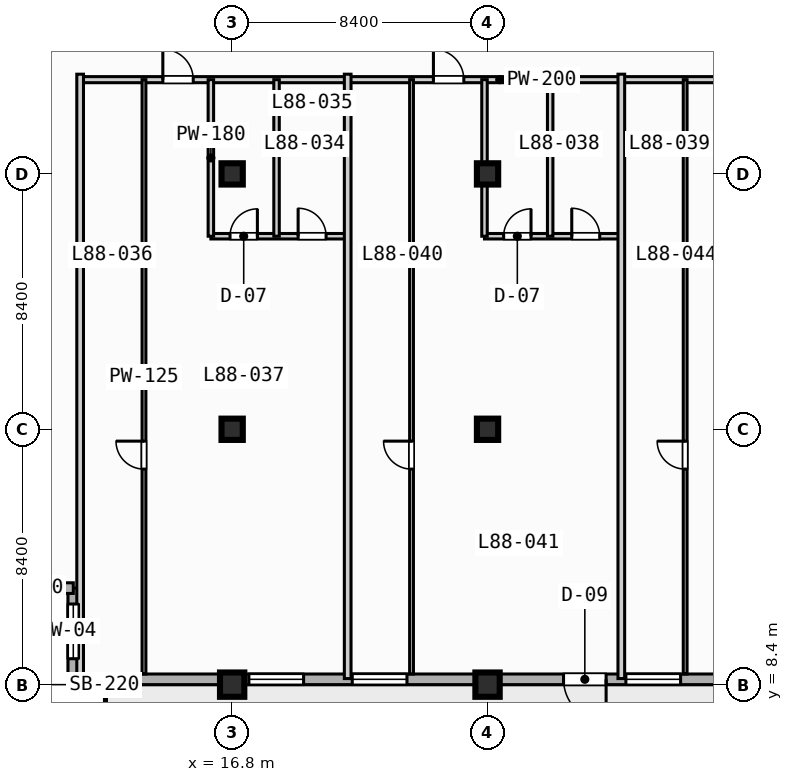
"""IFC4 building model, lengths in metres.
Left out: names, types, materials, properties, quantities, classifications, styles, units other than length and angle.
Written with IfcOpenShell. Run it as: python <this file> out.ifc"""

import sys

from ifc_helpers import new_model, si_unit, direction, frame, frame_2d, origin, origin_2d, place, context, subcontext, project, spatial, rectangle, extrude, element, fill, save


model = new_model("IFC4")
c1 = context("Model", 3, precision=1e-05, world=origin(), true_north=direction((0.0, 1.0)))
c2 = subcontext(c1, "Body", "Model", "MODEL_VIEW")
j1 = project(units=[si_unit("LENGTHUNIT", "METRE"), si_unit("PLANEANGLEUNIT", "RADIAN")], contexts=[c1])
p1 = place(None, origin())
s1 = spatial("IfcSite", under=j1, at=p1, CompositionType="ELEMENT")
p2 = place(p1, origin())
s2 = spatial("IfcBuilding", under=s1, at=p2, CompositionType="ELEMENT")
p3 = place(p2, frame((0.0, 0.0, 355.4)))
s3 = spatial("IfcBuildingStorey", under=s2, at=p3, CompositionType="ELEMENT", Elevation=355.4)
p4 = place(p3, frame((16.8, 8.4, 0.0), z_axis=(0.0, 0.0, 1.0), x_axis=(1.0, 0.0, 0.0)))
e1 = element("IfcColumn", 1, at=p4, inside=s3, PredefinedType="COLUMN", context=c2, shape_type="SweptSolid", body=[
    extrude(rectangle(XDim=0.8, YDim=0.8, at=origin_2d()), origin(), (0.0, 0.0, 1.0), 4.2),
])
for number, where, z_axis, x_axis in (
    (2, (16.8, 16.8, 0.0), (0.0, 0.0, 1.0), (1.0, 0.0, 0.0)),
    (3, (16.8, 25.2, 0.0), (0.0, 0.0, 1.0), (1.0, 0.0, 0.0)),
):
    element("IfcColumn", number, at=place(p3, frame(where, z_axis=z_axis, x_axis=x_axis)), inside=s3, PredefinedType="COLUMN", context=c2, shape_type="SweptSolid", body=[
        extrude(rectangle(XDim=0.7, YDim=0.7, at=origin_2d()), origin(), (0.0, 0.0, 1.0), 4.2),
    ])
p5 = place(p3, frame((25.2, 8.4, 0.0), z_axis=(0.0, 0.0, 1.0), x_axis=(1.0, 0.0, 0.0)))
e4 = element("IfcColumn", 4, at=p5, inside=s3, PredefinedType="COLUMN", context=c2, shape_type="SweptSolid", body=[
    extrude(rectangle(XDim=0.8, YDim=0.8, at=origin_2d()), origin(), (0.0, 0.0, 1.0), 4.2),
])
for number, where, z_axis, x_axis in (
    (5, (25.2, 16.8, 0.0), (0.0, 0.0, 1.0), (1.0, 0.0, 0.0)),
    (6, (25.2, 25.2, 0.0), (0.0, 0.0, 1.0), (1.0, 0.0, 0.0)),
):
    element("IfcColumn", number, at=place(p3, frame(where, z_axis=z_axis, x_axis=x_axis)), inside=s3, PredefinedType="COLUMN", context=c2, shape_type="SweptSolid", body=[
        extrude(rectangle(XDim=0.7, YDim=0.7, at=origin_2d()), origin(), (0.0, 0.0, 1.0), 4.2),
    ])
p6 = place(p3, frame((11.575, 8.575, 0.0), z_axis=(0.0, 0.0, 1.0), x_axis=(0.0, 1.0, 0.0)))
e7 = element("IfcWall", 7, at=p6, inside=s3, PredefinedType="STANDARD", context=c2, shape_type="SweptSolid", body=[
    extrude(rectangle(XDim=3.0, YDim=0.35, at=frame_2d((1.5, 0.0))), origin(), (0.0, 0.0, 1.0), 3.97),
])
p7 = place(p6, frame((0.677, 0.0, 0.85)))
e8 = element("IfcOpeningElement", 8, at=p7, cuts=e7, PredefinedType="OPENING", context=c2, shape_type="SweptSolid", body=[
    extrude(rectangle(XDim=1.8, YDim=1.8, at=frame_2d((0.9, 0.9))), frame((0.0, 0.185, 0.0), z_axis=(0.0, -1.0, 0.0), x_axis=(1.0, 0.0, 0.0)), (0.0, 0.0, 1.0), 0.37),
])
p8 = place(p3, frame((11.575, 11.575, 0.0), z_axis=(0.0, 0.0, 1.0), x_axis=(-1.0, 0.0, 0.0)))
e9 = element("IfcWall", 9, at=p8, inside=s3, PredefinedType="STANDARD", context=c2, shape_type="SweptSolid", body=[
    extrude(rectangle(XDim=3.0, YDim=0.35, at=frame_2d((1.5, 0.0))), origin(), (0.0, 0.0, 1.0), 3.97),
])
p9 = place(p3, frame((64.025, 8.575, 0.0), z_axis=(0.0, 0.0, 1.0), x_axis=(-1.0, 0.0, 0.0)))
e10 = element("IfcWall", 10, at=p9, inside=s3, PredefinedType="STANDARD", context=c2, shape_type="SweptSolid", body=[
    extrude(rectangle(XDim=52.45, YDim=0.35, at=frame_2d((26.225, 0.0))), origin(), (0.0, 0.0, 1.0), 3.97),
])
p10 = place(p9, frame((34.925, 0.0, 0.0)))
e11 = element("IfcOpeningElement", 11, at=p10, cuts=e10, PredefinedType="OPENING", context=c2, shape_type="SweptSolid", body=[
    extrude(rectangle(XDim=1.4, YDim=2.2, at=frame_2d((0.7, 1.1))), frame((0.0, 0.185, 0.0), z_axis=(0.0, -1.0, 0.0), x_axis=(1.0, 0.0, 0.0)), (0.0, 0.0, 1.0), 0.37),
])
p11 = place(p9, frame((24.825, 0.0, 0.85)))
e12 = element("IfcOpeningElement", 12, at=p11, cuts=e10, PredefinedType="OPENING", context=c2, shape_type="SweptSolid", body=[
    extrude(rectangle(XDim=2.8, YDim=2.1, at=frame_2d((1.4, 1.05))), frame((0.0, 0.185, 0.0), z_axis=(0.0, -1.0, 0.0), x_axis=(1.0, 0.0, 0.0)), (0.0, 0.0, 1.0), 0.37),
])
p12 = place(p9, frame((16.425, 0.0, 0.85)))
e13 = element("IfcOpeningElement", 13, at=p12, cuts=e10, PredefinedType="OPENING", context=c2, shape_type="SweptSolid", body=[
    extrude(rectangle(XDim=2.8, YDim=2.1, at=frame_2d((1.4, 1.05))), frame((0.0, 0.185, 0.0), z_axis=(0.0, -1.0, 0.0), x_axis=(1.0, 0.0, 0.0)), (0.0, 0.0, 1.0), 0.37),
])
p13 = place(p9, frame((50.275, 0.0, 0.85)))
e14 = element("IfcOpeningElement", 14, at=p13, cuts=e10, PredefinedType="OPENING", context=c2, shape_type="SweptSolid", body=[
    extrude(rectangle(XDim=1.8, YDim=1.8, at=frame_2d((0.9, 0.9))), frame((0.0, 0.185, 0.0), z_axis=(0.0, -1.0, 0.0), x_axis=(1.0, 0.0, 0.0)), (0.0, 0.0, 1.0), 0.37),
])
p14 = place(p9, frame((44.875, 0.0, 0.85)))
e15 = element("IfcOpeningElement", 15, at=p14, cuts=e10, PredefinedType="OPENING", context=c2, shape_type="SweptSolid", body=[
    extrude(rectangle(XDim=1.8, YDim=1.8, at=frame_2d((0.9, 0.9))), frame((0.0, 0.185, 0.0), z_axis=(0.0, -1.0, 0.0), x_axis=(1.0, 0.0, 0.0)), (0.0, 0.0, 1.0), 0.37),
])
p15 = place(p9, frame((41.475, 0.0, 0.85)))
e16 = element("IfcOpeningElement", 16, at=p15, cuts=e10, PredefinedType="OPENING", context=c2, shape_type="SweptSolid", body=[
    extrude(rectangle(XDim=1.8, YDim=1.8, at=frame_2d((0.9, 0.9))), frame((0.0, 0.185, 0.0), z_axis=(0.0, -1.0, 0.0), x_axis=(1.0, 0.0, 0.0)), (0.0, 0.0, 1.0), 0.37),
])
p16 = place(p9, frame((32.475, 0.0, 0.85)))
e17 = element("IfcOpeningElement", 17, at=p16, cuts=e10, PredefinedType="OPENING", context=c2, shape_type="SweptSolid", body=[
    extrude(rectangle(XDim=1.8, YDim=1.8, at=frame_2d((0.9, 0.9))), frame((0.0, 0.185, 0.0), z_axis=(0.0, -1.0, 0.0), x_axis=(1.0, 0.0, 0.0)), (0.0, 0.0, 1.0), 0.37),
])
p17 = place(p3, frame((11.8, 28.3, 0.0), z_axis=(0.0, 0.0, 1.0), x_axis=(1.0, 0.0, 0.0)))
e18 = element("IfcWall", 18, at=p17, inside=s3, PredefinedType="PARTITIONING", context=c2, shape_type="SweptSolid", body=[
    extrude(rectangle(XDim=27.6, YDim=0.2, at=frame_2d((13.8, 0.0))), origin(), (0.0, 0.0, 1.0), 3.97),
])
p18 = place(p17, frame((2.72, 0.0, 0.0)))
e19 = element("IfcOpeningElement", 19, at=p18, cuts=e18, PredefinedType="OPENING", context=c2, shape_type="SweptSolid", body=[
    extrude(rectangle(XDim=1.0, YDim=2.15, at=frame_2d((0.5, 1.075))), frame((0.0, 0.11, 0.0), z_axis=(0.0, -1.0, 0.0), x_axis=(1.0, 0.0, 0.0)), (0.0, 0.0, 1.0), 0.22),
])
p19 = place(p17, frame((11.62, 0.0, 0.0)))
e20 = element("IfcOpeningElement", 20, at=p19, cuts=e18, PredefinedType="OPENING", context=c2, shape_type="SweptSolid", body=[
    extrude(rectangle(XDim=1.0, YDim=2.15, at=frame_2d((0.5, 1.075))), frame((0.0, 0.11, 0.0), z_axis=(0.0, -1.0, 0.0), x_axis=(1.0, 0.0, 0.0)), (0.0, 0.0, 1.0), 0.22),
])
p20 = place(p17, frame((21.02, 0.0, 0.0)))
e21 = element("IfcOpeningElement", 21, at=p20, cuts=e18, PredefinedType="OPENING", context=c2, shape_type="SweptSolid", body=[
    extrude(rectangle(XDim=1.0, YDim=2.15, at=frame_2d((0.5, 1.075))), frame((0.0, 0.11, 0.0), z_axis=(0.0, -1.0, 0.0), x_axis=(1.0, 0.0, 0.0)), (0.0, 0.0, 1.0), 0.22),
])
p21 = place(p3, frame((11.8, 8.6, 0.0), z_axis=(0.0, 0.0, 1.0), x_axis=(0.0, 1.0, 0.0)))
e22 = element("IfcWall", 22, at=p21, inside=s3, PredefinedType="PARTITIONING", context=c2, shape_type="SweptSolid", body=[
    extrude(rectangle(XDim=19.88, YDim=0.22, at=frame_2d((9.94, 0.0))), origin(), (0.0, 0.0, 1.0), 3.97),
])
p22 = place(p3, frame((16.1, 23.15, 0.0), z_axis=(0.0, 0.0, 1.0), x_axis=(1.0, 0.0, 0.0)))
e23 = element("IfcWall", 23, at=p22, inside=s3, PredefinedType="PLUMBINGWALL", context=c2, shape_type="SweptSolid", body=[
    extrude(rectangle(XDim=4.5, YDim=0.18, at=frame_2d((2.25, 0.0))), origin(), (0.0, 0.0, 1.0), 3.97),
])
p23 = place(p22, frame((0.63, 0.0, 0.0)))
e24 = element("IfcOpeningElement", 24, at=p23, cuts=e23, PredefinedType="OPENING", context=c2, shape_type="SweptSolid", body=[
    extrude(rectangle(XDim=0.9, YDim=2.1, at=frame_2d((0.45, 1.05))), frame((0.0, 0.1, 0.0), z_axis=(0.0, -1.0, 0.0), x_axis=(1.0, 0.0, 0.0)), (0.0, 0.0, 1.0), 0.2),
])
p24 = place(p22, frame((2.87, 0.0, 0.0)))
e25 = element("IfcOpeningElement", 25, at=p24, cuts=e23, PredefinedType="OPENING", context=c2, shape_type="SweptSolid", body=[
    extrude(rectangle(XDim=0.92, YDim=2.1, at=frame_2d((0.46, 1.05))), frame((0.0, 0.1, 0.0), z_axis=(0.0, -1.0, 0.0), x_axis=(1.0, 0.0, 0.0)), (0.0, 0.0, 1.0), 0.2),
])
for number, where, z_axis, x_axis in (
    (26, (16.1, 23.15, 0.0), (0.0, 0.0, 1.0), (0.0, 1.0, 0.0)),
    (27, (18.26, 23.15, 0.0), (0.0, 0.0, 1.0), (0.0, 1.0, 0.0)),
):
    element("IfcWall", number, at=place(p3, frame(where, z_axis=z_axis, x_axis=x_axis)), inside=s3, PredefinedType="PLUMBINGWALL", context=c2, shape_type="SweptSolid", body=[
        extrude(rectangle(XDim=5.15, YDim=0.18, at=frame_2d((2.575, 0.0))), origin(), (0.0, 0.0, 1.0), 3.97),
    ])
p25 = place(p3, frame((13.9, 8.75, 0.0), z_axis=(0.0, 0.0, 1.0), x_axis=(0.0, 1.0, 0.0)))
e28 = element("IfcWall", 28, at=p25, inside=s3, PredefinedType="PARTITIONING", context=c2, shape_type="SweptSolid", body=[
    extrude(rectangle(XDim=19.55, YDim=0.125, at=frame_2d((9.775, 0.0))), origin(), (0.0, 0.0, 1.0), 3.97),
])
p26 = place(p25, frame((6.74, 0.0, 0.0)))
e29 = element("IfcOpeningElement", 29, at=p26, cuts=e28, PredefinedType="OPENING", context=c2, shape_type="SweptSolid", body=[
    extrude(rectangle(XDim=0.92, YDim=2.1, at=frame_2d((0.46, 1.05))), frame((0.0, 0.073, 0.0), z_axis=(0.0, -1.0, 0.0), x_axis=(1.0, 0.0, 0.0)), (0.0, 0.0, 1.0), 0.145),
])
p27 = place(p3, frame((20.6, 8.6, 0.0), z_axis=(0.0, 0.0, 1.0), x_axis=(0.0, 1.0, 0.0)))
e30 = element("IfcWall", 30, at=p27, inside=s3, PredefinedType="PARTITIONING", context=c2, shape_type="SweptSolid", body=[
    extrude(rectangle(XDim=19.88, YDim=0.22, at=frame_2d((9.94, 0.0))), origin(), (0.0, 0.0, 1.0), 3.97),
])
p28 = place(p3, frame((25.1, 23.15, 0.0), z_axis=(0.0, 0.0, 1.0), x_axis=(1.0, 0.0, 0.0)))
e31 = element("IfcWall", 31, at=p28, inside=s3, PredefinedType="PLUMBINGWALL", context=c2, shape_type="SweptSolid", body=[
    extrude(rectangle(XDim=4.5, YDim=0.18, at=frame_2d((2.25, 0.0))), origin(), (0.0, 0.0, 1.0), 3.97),
])
p29 = place(p28, frame((0.63, 0.0, 0.0)))
e32 = element("IfcOpeningElement", 32, at=p29, cuts=e31, PredefinedType="OPENING", context=c2, shape_type="SweptSolid", body=[
    extrude(rectangle(XDim=0.9, YDim=2.1, at=frame_2d((0.45, 1.05))), frame((0.0, 0.1, 0.0), z_axis=(0.0, -1.0, 0.0), x_axis=(1.0, 0.0, 0.0)), (0.0, 0.0, 1.0), 0.2),
])
p30 = place(p28, frame((2.87, 0.0, 0.0)))
e33 = element("IfcOpeningElement", 33, at=p30, cuts=e31, PredefinedType="OPENING", context=c2, shape_type="SweptSolid", body=[
    extrude(rectangle(XDim=0.92, YDim=2.1, at=frame_2d((0.46, 1.05))), frame((0.0, 0.1, 0.0), z_axis=(0.0, -1.0, 0.0), x_axis=(1.0, 0.0, 0.0)), (0.0, 0.0, 1.0), 0.2),
])
p31 = place(p3, frame((25.1, 23.15, 0.0), z_axis=(0.0, 0.0, 1.0), x_axis=(0.0, 1.0, 0.0)))
e34 = element("IfcWall", 34, at=p31, inside=s3, PredefinedType="PLUMBINGWALL", context=c2, shape_type="SweptSolid", body=[
    extrude(rectangle(XDim=5.15, YDim=0.18, at=frame_2d((2.575, 0.0))), origin(), (0.0, 0.0, 1.0), 3.37),
])
p32 = place(p3, frame((27.26, 23.15, 0.0), z_axis=(0.0, 0.0, 1.0), x_axis=(0.0, 1.0, 0.0)))
e35 = element("IfcWall", 35, at=p32, inside=s3, PredefinedType="PLUMBINGWALL", context=c2, shape_type="SweptSolid", body=[
    extrude(rectangle(XDim=5.15, YDim=0.18, at=frame_2d((2.575, 0.0))), origin(), (0.0, 0.0, 1.0), 3.97),
])
p33 = place(p3, frame((22.7, 8.75, 0.0), z_axis=(0.0, 0.0, 1.0), x_axis=(0.0, 1.0, 0.0)))
e36 = element("IfcWall", 36, at=p33, inside=s3, PredefinedType="PARTITIONING", context=c2, shape_type="SweptSolid", body=[
    extrude(rectangle(XDim=19.55, YDim=0.125, at=frame_2d((9.775, 0.0))), origin(), (0.0, 0.0, 1.0), 3.97),
])
p34 = place(p33, frame((6.74, 0.0, 0.0)))
e37 = element("IfcOpeningElement", 37, at=p34, cuts=e36, PredefinedType="OPENING", context=c2, shape_type="SweptSolid", body=[
    extrude(rectangle(XDim=0.92, YDim=2.1, at=frame_2d((0.46, 1.05))), frame((0.0, 0.073, 0.0), z_axis=(0.0, -1.0, 0.0), x_axis=(1.0, 0.0, 0.0)), (0.0, 0.0, 1.0), 0.145),
])
p35 = place(p3, frame((29.6, 8.6, 0.0), z_axis=(0.0, 0.0, 1.0), x_axis=(0.0, 1.0, 0.0)))
e38 = element("IfcWall", 38, at=p35, inside=s3, PredefinedType="PARTITIONING", context=c2, shape_type="SweptSolid", body=[
    extrude(rectangle(XDim=19.88, YDim=0.22, at=frame_2d((9.94, 0.0))), origin(), (0.0, 0.0, 1.0), 3.607),
])
p36 = place(p3, frame((31.7, 8.75, 0.0), z_axis=(0.0, 0.0, 1.0), x_axis=(0.0, 1.0, 0.0)))
e39 = element("IfcWall", 39, at=p36, inside=s3, PredefinedType="PARTITIONING", context=c2, shape_type="SweptSolid", body=[
    extrude(rectangle(XDim=19.55, YDim=0.125, at=frame_2d((9.775, 0.0))), origin(), (0.0, 0.0, 1.0), 3.97),
])
p37 = place(p36, frame((6.74, 0.0, 0.0)))
e40 = element("IfcOpeningElement", 40, at=p37, cuts=e39, PredefinedType="OPENING", context=c2, shape_type="SweptSolid", body=[
    extrude(rectangle(XDim=0.92, YDim=2.1, at=frame_2d((0.46, 1.05))), frame((0.0, 0.073, 0.0), z_axis=(0.0, -1.0, 0.0), x_axis=(1.0, 0.0, 0.0)), (0.0, 0.0, 1.0), 0.145),
])
p38 = place(p7, origin())
e41 = element("IfcWindow", 41, at=p38, inside=s3, PartitioningType="SINGLE_PANEL", PredefinedType="WINDOW", context=c2, shape_type="SweptSolid", body=[
    extrude(rectangle(XDim=1.8, YDim=1.8, at=frame_2d((0.9, 0.9))), frame((0.0, 0.03, 0.0), z_axis=(0.0, -1.0, 0.0), x_axis=(1.0, 0.0, 0.0)), (0.0, 0.0, 1.0), 0.06),
])
fill(e8, e41)
p39 = place(p10, origin())
e42 = element("IfcDoor", 42, at=p39, inside=s3, OperationType="SINGLE_SWING_LEFT", PredefinedType="DOOR", context=c2, shape_type="SweptSolid", body=[
    extrude(rectangle(XDim=1.4, YDim=2.2, at=frame_2d((0.7, 1.1))), frame((0.0, 0.025, 0.0), z_axis=(0.0, -1.0, 0.0), x_axis=(1.0, 0.0, 0.0)), (0.0, 0.0, 1.0), 0.05),
])
fill(e11, e42)
p40 = place(p13, origin())
e43 = element("IfcWindow", 43, at=p40, inside=s3, PartitioningType="SINGLE_PANEL", PredefinedType="WINDOW", context=c2, shape_type="SweptSolid", body=[
    extrude(rectangle(XDim=1.8, YDim=1.8, at=frame_2d((0.9, 0.9))), frame((0.0, 0.03, 0.0), z_axis=(0.0, -1.0, 0.0), x_axis=(1.0, 0.0, 0.0)), (0.0, 0.0, 1.0), 0.06),
])
fill(e14, e43)
p41 = place(p14, origin())
e44 = element("IfcWindow", 44, at=p41, inside=s3, PartitioningType="SINGLE_PANEL", PredefinedType="WINDOW", context=c2, shape_type="SweptSolid", body=[
    extrude(rectangle(XDim=1.8, YDim=1.8, at=frame_2d((0.9, 0.9))), frame((0.0, 0.03, 0.0), z_axis=(0.0, -1.0, 0.0), x_axis=(1.0, 0.0, 0.0)), (0.0, 0.0, 1.0), 0.06),
])
fill(e15, e44)
p42 = place(p15, origin())
e45 = element("IfcWindow", 45, at=p42, inside=s3, PartitioningType="SINGLE_PANEL", PredefinedType="WINDOW", context=c2, shape_type="SweptSolid", body=[
    extrude(rectangle(XDim=1.8, YDim=1.8, at=frame_2d((0.9, 0.9))), frame((0.0, 0.03, 0.0), z_axis=(0.0, -1.0, 0.0), x_axis=(1.0, 0.0, 0.0)), (0.0, 0.0, 1.0), 0.06),
])
fill(e16, e45)
p43 = place(p16, origin())
e46 = element("IfcWindow", 46, at=p43, inside=s3, PartitioningType="SINGLE_PANEL", PredefinedType="WINDOW", context=c2, shape_type="SweptSolid", body=[
    extrude(rectangle(XDim=1.8, YDim=1.8, at=frame_2d((0.9, 0.9))), frame((0.0, 0.03, 0.0), z_axis=(0.0, -1.0, 0.0), x_axis=(1.0, 0.0, 0.0)), (0.0, 0.0, 1.0), 0.06),
])
fill(e17, e46)
p44 = place(p18, origin())
e47 = element("IfcDoor", 47, at=p44, inside=s3, OperationType="SINGLE_SWING_LEFT", PredefinedType="DOOR", context=c2, shape_type="SweptSolid", body=[
    extrude(rectangle(XDim=1.0, YDim=2.15, at=frame_2d((0.5, 1.075))), frame((0.0, 0.025, 0.0), z_axis=(0.0, -1.0, 0.0), x_axis=(1.0, 0.0, 0.0)), (0.0, 0.0, 1.0), 0.05),
])
fill(e19, e47)
p45 = place(p19, origin())
e48 = element("IfcDoor", 48, at=p45, inside=s3, OperationType="SINGLE_SWING_LEFT", PredefinedType="DOOR", context=c2, shape_type="SweptSolid", body=[
    extrude(rectangle(XDim=1.0, YDim=2.15, at=frame_2d((0.5, 1.075))), frame((0.0, 0.025, 0.0), z_axis=(0.0, -1.0, 0.0), x_axis=(1.0, 0.0, 0.0)), (0.0, 0.0, 1.0), 0.05),
])
fill(e20, e48)
p46 = place(p23, origin())
e49 = element("IfcDoor", 49, at=p46, inside=s3, OperationType="SINGLE_SWING_RIGHT", PredefinedType="DOOR", context=c2, shape_type="SweptSolid", body=[
    extrude(rectangle(XDim=0.9, YDim=2.1, at=frame_2d((0.45, 1.05))), frame((0.0, 0.025, 0.0), z_axis=(0.0, -1.0, 0.0), x_axis=(1.0, 0.0, 0.0)), (0.0, 0.0, 1.0), 0.05),
])
fill(e24, e49)
p47 = place(p24, origin())
e50 = element("IfcDoor", 50, at=p47, inside=s3, OperationType="SINGLE_SWING_LEFT", PredefinedType="DOOR", context=c2, shape_type="SweptSolid", body=[
    extrude(rectangle(XDim=0.92, YDim=2.1, at=frame_2d((0.46, 1.05))), frame((0.0, 0.025, 0.0), z_axis=(0.0, -1.0, 0.0), x_axis=(1.0, 0.0, 0.0)), (0.0, 0.0, 1.0), 0.05),
])
fill(e25, e50)
p48 = place(p26, origin())
e51 = element("IfcDoor", 51, at=p48, inside=s3, OperationType="SINGLE_SWING_RIGHT", PredefinedType="DOOR", context=c2, shape_type="SweptSolid", body=[
    extrude(rectangle(XDim=0.92, YDim=2.1, at=frame_2d((0.46, 1.05))), frame((0.0, 0.025, 0.0), z_axis=(0.0, -1.0, 0.0), x_axis=(1.0, 0.0, 0.0)), (0.0, 0.0, 1.0), 0.05),
])
fill(e29, e51)
p49 = place(p29, origin())
e52 = element("IfcDoor", 52, at=p49, inside=s3, OperationType="SINGLE_SWING_RIGHT", PredefinedType="DOOR", context=c2, shape_type="SweptSolid", body=[
    extrude(rectangle(XDim=0.9, YDim=2.1, at=frame_2d((0.45, 1.05))), frame((0.0, 0.025, 0.0), z_axis=(0.0, -1.0, 0.0), x_axis=(1.0, 0.0, 0.0)), (0.0, 0.0, 1.0), 0.05),
])
fill(e32, e52)
p50 = place(p30, origin())
e53 = element("IfcDoor", 53, at=p50, inside=s3, OperationType="SINGLE_SWING_LEFT", PredefinedType="DOOR", context=c2, shape_type="SweptSolid", body=[
    extrude(rectangle(XDim=0.92, YDim=2.1, at=frame_2d((0.46, 1.05))), frame((0.0, 0.025, 0.0), z_axis=(0.0, -1.0, 0.0), x_axis=(1.0, 0.0, 0.0)), (0.0, 0.0, 1.0), 0.05),
])
fill(e33, e53)
p51 = place(p34, origin())
e54 = element("IfcDoor", 54, at=p51, inside=s3, OperationType="SINGLE_SWING_RIGHT", PredefinedType="DOOR", context=c2, shape_type="SweptSolid", body=[
    extrude(rectangle(XDim=0.92, YDim=2.1, at=frame_2d((0.46, 1.05))), frame((0.0, 0.025, 0.0), z_axis=(0.0, -1.0, 0.0), x_axis=(1.0, 0.0, 0.0)), (0.0, 0.0, 1.0), 0.05),
])
fill(e37, e54)
p52 = place(p37, origin())
e55 = element("IfcDoor", 55, at=p52, inside=s3, OperationType="SINGLE_SWING_RIGHT", PredefinedType="DOOR", context=c2, shape_type="SweptSolid", body=[
    extrude(rectangle(XDim=0.92, YDim=2.1, at=frame_2d((0.46, 1.05))), frame((0.0, 0.025, 0.0), z_axis=(0.0, -1.0, 0.0), x_axis=(1.0, 0.0, 0.0)), (0.0, 0.0, 1.0), 0.05),
])
fill(e40, e55)
save(model, sys.argv[1])
